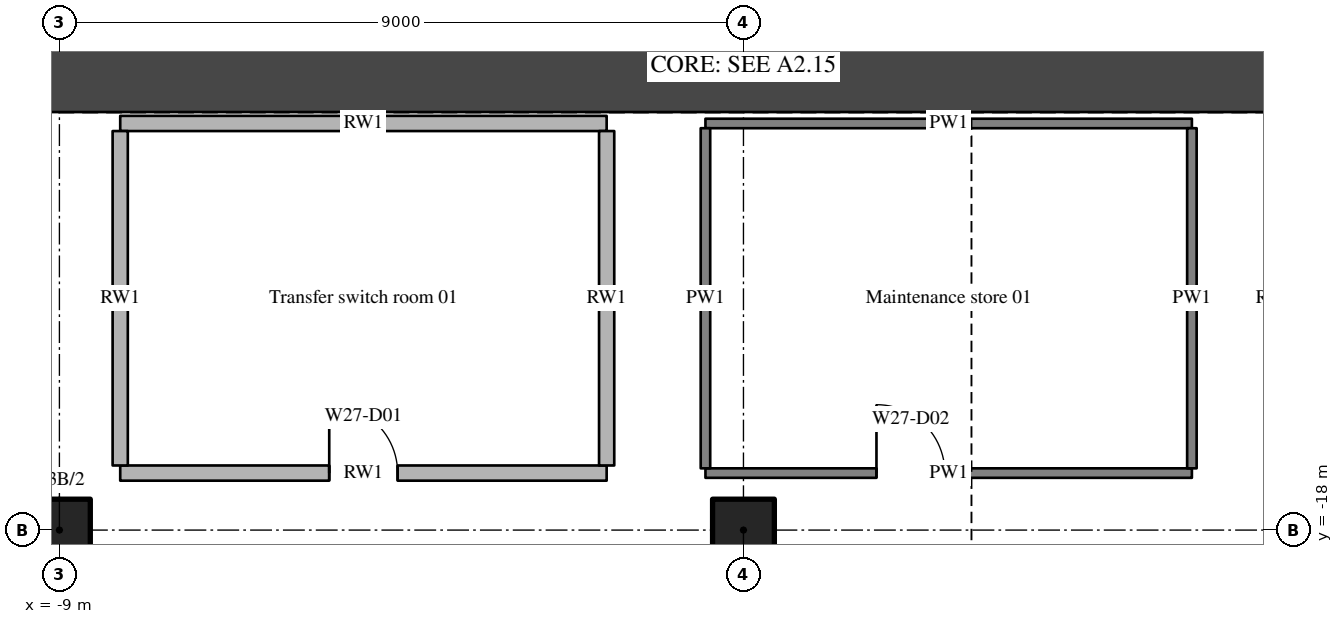
"""IFC4 building model, lengths in metres.
Left out: names, types, materials, properties, quantities, classifications, styles, units other than length and angle.
Written with IfcOpenShell. Run it as: python <this file> out.ifc"""

import sys

from ifc_helpers import new_model, si_unit, direction, frame, frame_2d, origin, origin_2d, place, context, subcontext, project, spatial, rectangle, hollow_circle, extrude, element, fill, save


model = new_model("IFC4")
c1 = context("Model", 3, precision=1e-05, world=origin(), true_north=direction((0.0, 1.0)))
c2 = subcontext(c1, "Body", "Model", "MODEL_VIEW")
j1 = project(units=[si_unit("LENGTHUNIT", "METRE"), si_unit("PLANEANGLEUNIT", "RADIAN")], contexts=[c1])
p1 = place(None, origin())
s1 = spatial("IfcSite", under=j1, at=p1, CompositionType="ELEMENT")
p2 = place(p1, origin())
s2 = spatial("IfcBuilding", under=s1, at=p2, CompositionType="ELEMENT")
p3 = place(p2, frame((0.0, 0.0, 114.3)))
s3 = spatial("IfcBuildingStorey", under=s2, at=p3, CompositionType="ELEMENT", Elevation=114.3)
for number, where, z_axis, x_axis in (
    (1, (-9.0, -18.0, 0.0), (0.0, 0.0, 1.0), (1.0, 0.0, 0.0)),
    (2, (0.0, -18.0, 0.0), (0.0, 0.0, 1.0), (1.0, 0.0, 0.0)),
):
    element("IfcColumn", number, at=place(p3, frame(where, z_axis=z_axis, x_axis=x_axis)), inside=s3, PredefinedType="COLUMN", context=c2, shape_type="SweptSolid", body=[
        extrude(hollow_circle(Radius=0.406, WallThickness=0.036, at=origin_2d()), origin(), (0.0, 0.0, 1.0), 6.78),
    ])
p4 = place(p3, frame((-15.0, -12.0, 0.0), z_axis=(0.0, 0.0, 1.0), x_axis=(1.0, 0.0, 0.0)))
e3 = element("IfcWall", 3, at=p4, inside=s3, PredefinedType="SHEAR", context=c2, shape_type="SweptSolid", body=[
    extrude(rectangle(XDim=30.0, YDim=1.0, at=frame_2d((15.0, 0.0))), origin(), (0.0, 0.0, 1.0), 7.2),
])
p5 = place(p3, frame((-8.2, -17.25, 0.0), z_axis=(0.0, 0.0, 1.0), x_axis=(1.0, 0.0, 0.0)))
e4 = element("IfcWall", 4, at=p5, inside=s3, PredefinedType="SOLIDWALL", context=c2, shape_type="SweptSolid", body=[
    extrude(rectangle(XDim=6.4, YDim=0.2, at=frame_2d((3.2, 0.0))), origin(), (0.0, 0.0, 1.0), 5.5),
])
p6 = place(p5, frame((2.75, 0.0, 0.0)))
e5 = element("IfcOpeningElement", 5, at=p6, cuts=e4, PredefinedType="OPENING", context=c2, shape_type="SweptSolid", body=[
    extrude(rectangle(XDim=0.9, YDim=2.1, at=frame_2d((0.45, 1.05))), frame((0.0, 0.11, 0.0), z_axis=(0.0, -1.0, 0.0), x_axis=(1.0, 0.0, 0.0)), (0.0, 0.0, 1.0), 0.22),
])
p7 = place(p3, frame((-0.5, -17.25, 0.0), z_axis=(0.0, 0.0, 1.0), x_axis=(1.0, 0.0, 0.0)))
e6 = element("IfcWall", 6, at=p7, inside=s3, PredefinedType="PARTITIONING", context=c2, shape_type="SweptSolid", body=[
    extrude(rectangle(XDim=6.4, YDim=0.125, at=frame_2d((3.2, 0.0))), origin(), (0.0, 0.0, 1.0), 5.5),
])
p8 = place(p7, frame((2.25, 0.0, 0.0)))
e7 = element("IfcOpeningElement", 7, at=p8, cuts=e6, PredefinedType="OPENING", context=c2, shape_type="SweptSolid", body=[
    extrude(rectangle(XDim=0.9, YDim=2.1, at=frame_2d((0.45, 1.05))), frame((0.0, 0.073, 0.0), z_axis=(0.0, -1.0, 0.0), x_axis=(1.0, 0.0, 0.0)), (0.0, 0.0, 1.0), 0.145),
])
p9 = place(p3, frame((-8.2, -12.65, 0.0), z_axis=(0.0, 0.0, 1.0), x_axis=(1.0, 0.0, 0.0)))
e8 = element("IfcWall", 8, at=p9, inside=s3, PredefinedType="SOLIDWALL", context=c2, shape_type="SweptSolid", body=[
    extrude(rectangle(XDim=6.4, YDim=0.2, at=frame_2d((3.2, 0.0))), origin(), (0.0, 0.0, 1.0), 5.5),
])
p10 = place(p3, frame((-0.5, -12.65, 0.0), z_axis=(0.0, 0.0, 1.0), x_axis=(1.0, 0.0, 0.0)))
e9 = element("IfcWall", 9, at=p10, inside=s3, PredefinedType="PARTITIONING", context=c2, shape_type="SweptSolid", body=[
    extrude(rectangle(XDim=6.4, YDim=0.125, at=frame_2d((3.2, 0.0))), origin(), (0.0, 0.0, 1.0), 5.5),
])
for number, where, z_axis, x_axis in (
    (10, (-8.2, -17.15, 0.0), (0.0, 0.0, 1.0), (0.0, 1.0, 0.0)),
    (11, (-1.8, -17.15, 0.0), (0.0, 0.0, 1.0), (0.0, 1.0, 0.0)),
):
    element("IfcWall", number, at=place(p3, frame(where, z_axis=z_axis, x_axis=x_axis)), inside=s3, PredefinedType="SOLIDWALL", context=c2, shape_type="SweptSolid", body=[
        extrude(rectangle(XDim=4.4, YDim=0.2, at=frame_2d((2.2, 0.0))), origin(), (0.0, 0.0, 1.0), 5.5),
    ])
for number, where, z_axis, x_axis in (
    (12, (-0.5, -17.188, 0.0), (0.0, 0.0, 1.0), (0.0, 1.0, 0.0)),
    (13, (5.9, -17.188, 0.0), (0.0, 0.0, 1.0), (0.0, 1.0, 0.0)),
):
    element("IfcWall", number, at=place(p3, frame(where, z_axis=z_axis, x_axis=x_axis)), inside=s3, PredefinedType="PARTITIONING", context=c2, shape_type="SweptSolid", body=[
        extrude(rectangle(XDim=4.475, YDim=0.125, at=frame_2d((2.238, 0.0))), origin(), (0.0, 0.0, 1.0), 5.5),
    ])
p11 = place(p6, origin())
e14 = element("IfcDoor", 14, at=p11, inside=s3, OperationType="SINGLE_SWING_LEFT", PredefinedType="DOOR", context=c2, shape_type="SweptSolid", body=[
    extrude(rectangle(XDim=0.9, YDim=2.1, at=frame_2d((0.45, 1.05))), frame((0.0, 0.025, 0.0), z_axis=(0.0, -1.0, 0.0), x_axis=(1.0, 0.0, 0.0)), (0.0, 0.0, 1.0), 0.05),
])
fill(e5, e14)
p12 = place(p8, origin())
e15 = element("IfcDoor", 15, at=p12, inside=s3, OperationType="SINGLE_SWING_LEFT", PredefinedType="DOOR", context=c2, shape_type="SweptSolid", body=[
    extrude(rectangle(XDim=0.9, YDim=2.1, at=frame_2d((0.45, 1.05))), frame((0.0, 0.025, 0.0), z_axis=(0.0, -1.0, 0.0), x_axis=(1.0, 0.0, 0.0)), (0.0, 0.0, 1.0), 0.05),
])
fill(e7, e15)
save(model, sys.argv[1])
